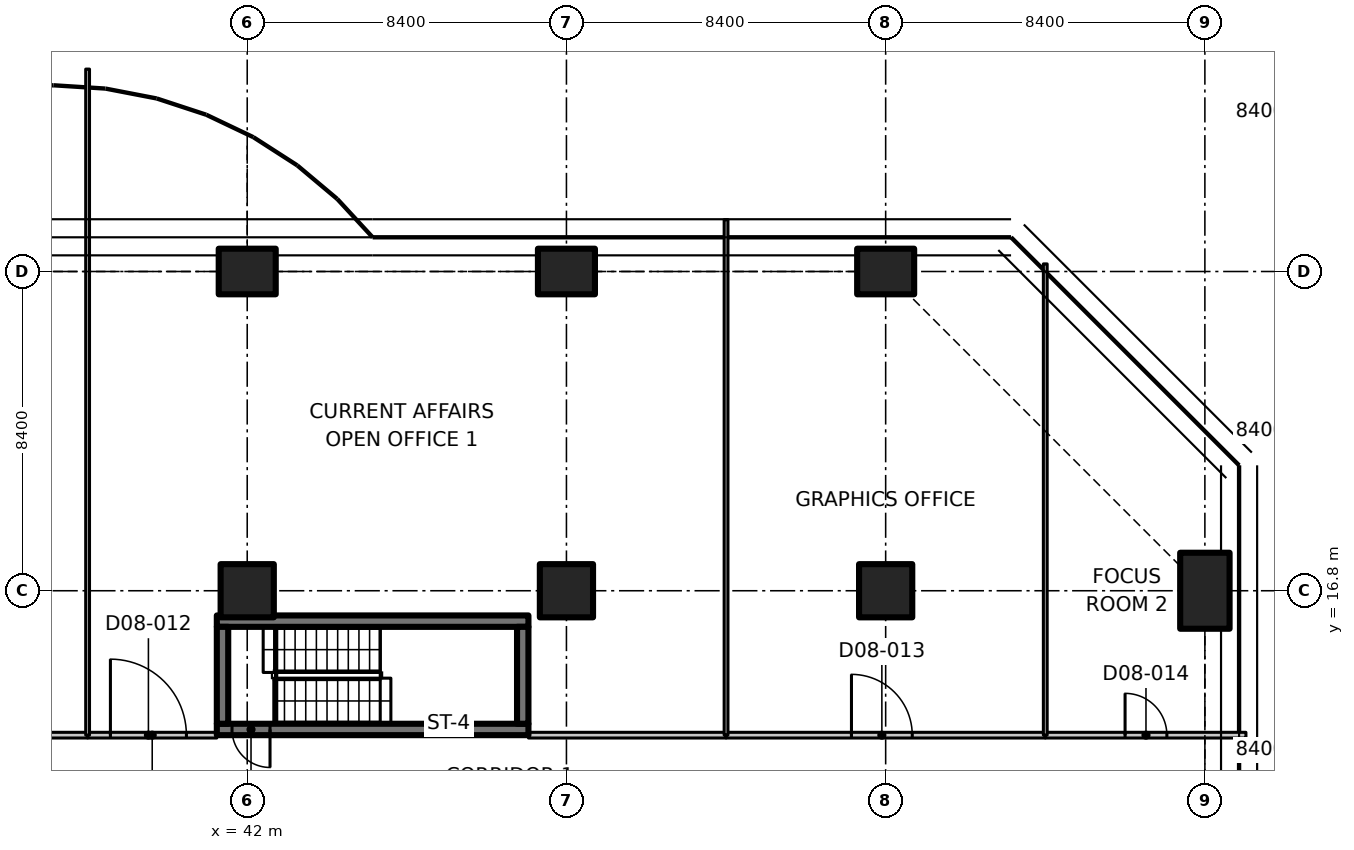
"""IFC4 building model, lengths in metres.
Left out: names, types, materials, properties, quantities, classifications, styles, units other than length and angle.
Written with IfcOpenShell. Run it as: python <this file> out.ifc"""

import sys

from ifc_helpers import new_model, si_unit, direction, frame, frame_2d, origin, origin_2d, place, context, subcontext, project, spatial, polyline, rectangle, outline, extrude, element, fill, save


model = new_model("IFC4")
c1 = context("Model", 3, precision=1e-05, world=origin(), true_north=direction((0.0, 1.0)))
c2 = subcontext(c1, "Body", "Model", "MODEL_VIEW")
j1 = project(units=[si_unit("LENGTHUNIT", "METRE"), si_unit("PLANEANGLEUNIT", "RADIAN")], contexts=[c1])
p1 = place(None, origin())
s1 = spatial("IfcSite", under=j1, at=p1, CompositionType="ELEMENT")
p2 = place(p1, origin())
s2 = spatial("IfcBuilding", under=s1, at=p2, CompositionType="ELEMENT")
p3 = place(p2, frame((0.0, 0.0, 47.3)))
s3 = spatial("IfcBuildingStorey", under=s2, at=p3, CompositionType="ELEMENT", Elevation=47.3)
p4 = place(p3, frame((42.0, 16.8, 0.0), z_axis=(0.0, 0.0, 1.0), x_axis=(1.0, 0.0, 0.0)))
e1 = element("IfcColumn", 1, at=p4, inside=s3, PredefinedType="COLUMN", context=c2, shape_type="SweptSolid", body=[
    extrude(rectangle(XDim=1.4, YDim=1.4, at=origin_2d()), origin(), (0.0, 0.0, 1.0), 3.35),
])
p5 = place(p3, frame((42.0, 25.2, 0.0), z_axis=(0.0, 0.0, 1.0), x_axis=(0.0, 1.0, 0.0)))
e2 = element("IfcColumn", 2, at=p5, inside=s3, PredefinedType="COLUMN", context=c2, shape_type="SweptSolid", body=[
    extrude(rectangle(XDim=1.2, YDim=1.5, at=origin_2d()), origin(), (0.0, 0.0, 1.0), 3.35),
])
p6 = place(p3, frame((50.4, 16.8, 0.0), z_axis=(0.0, 0.0, 1.0), x_axis=(1.0, 0.0, 0.0)))
e3 = element("IfcColumn", 3, at=p6, inside=s3, PredefinedType="COLUMN", context=c2, shape_type="SweptSolid", body=[
    extrude(rectangle(XDim=1.4, YDim=1.4, at=origin_2d()), origin(), (0.0, 0.0, 1.0), 3.35),
])
p7 = place(p3, frame((50.4, 25.2, 0.0), z_axis=(0.0, 0.0, 1.0), x_axis=(0.0, 1.0, 0.0)))
e4 = element("IfcColumn", 4, at=p7, inside=s3, PredefinedType="COLUMN", context=c2, shape_type="SweptSolid", body=[
    extrude(rectangle(XDim=1.2, YDim=1.5, at=origin_2d()), origin(), (0.0, 0.0, 1.0), 3.35),
])
p8 = place(p3, frame((58.8, 16.8, 0.0), z_axis=(0.0, 0.0, 1.0), x_axis=(1.0, 0.0, 0.0)))
e5 = element("IfcColumn", 5, at=p8, inside=s3, PredefinedType="COLUMN", context=c2, shape_type="SweptSolid", body=[
    extrude(rectangle(XDim=1.4, YDim=1.4, at=origin_2d()), origin(), (0.0, 0.0, 1.0), 3.35),
])
p9 = place(p3, frame((58.8, 25.2, 0.0), z_axis=(0.0, 0.0, 1.0), x_axis=(0.0, 1.0, 0.0)))
e6 = element("IfcColumn", 6, at=p9, inside=s3, PredefinedType="COLUMN", context=c2, shape_type="SweptSolid", body=[
    extrude(rectangle(XDim=1.2, YDim=1.5, at=origin_2d()), origin(), (0.0, 0.0, 1.0), 3.35),
])
p10 = place(p3, frame((67.2, 16.8, 0.0), z_axis=(0.0, 0.0, 1.0), x_axis=(1.0, 0.0, 0.0)))
e7 = element("IfcColumn", 7, at=p10, inside=s3, PredefinedType="COLUMN", context=c2, shape_type="SweptSolid", body=[
    extrude(rectangle(XDim=1.3, YDim=2.0, at=origin_2d()), origin(), (0.0, 0.0, 1.0), 3.35),
])
p11 = place(p3, frame((49.4, 13.15, 0.0), z_axis=(0.0, 0.0, 1.0), x_axis=(-1.0, 0.0, 0.0)))
e8 = element("IfcWall", 8, at=p11, inside=s3, PredefinedType="SHEAR", context=c2, shape_type="SweptSolid", body=[
    extrude(rectangle(XDim=8.2, YDim=0.3, at=frame_2d((4.1, 0.0))), origin(), (0.0, 0.0, 1.0), 3.35),
])
p12 = place(p11, frame((6.8, 0.0, 0.0)))
e9 = element("IfcOpeningElement", 9, at=p12, cuts=e8, PredefinedType="OPENING", context=c2, shape_type="SweptSolid", body=[
    extrude(rectangle(XDim=1.0, YDim=2.1, at=frame_2d((0.5, 1.05))), frame((0.0, 0.16, 0.0), z_axis=(0.0, -1.0, 0.0), x_axis=(1.0, 0.0, 0.0)), (0.0, 0.0, 1.0), 0.32),
])
p13 = place(p3, frame((41.2, 16.0, 0.0), z_axis=(0.0, 0.0, 1.0), x_axis=(1.0, 0.0, 0.0)))
e10 = element("IfcWall", 10, at=p13, inside=s3, PredefinedType="SHEAR", context=c2, shape_type="SweptSolid", body=[
    extrude(rectangle(XDim=8.2, YDim=0.3, at=frame_2d((4.1, 0.0))), origin(), (0.0, 0.0, 1.0), 3.35),
])
for number, where, z_axis, x_axis in (
    (11, (41.35, 13.3, 0.0), (0.0, 0.0, 1.0), (0.0, 1.0, 0.0)),
    (12, (49.25, 13.3, 0.0), (0.0, 0.0, 1.0), (0.0, 1.0, 0.0)),
):
    element("IfcWall", number, at=place(p3, frame(where, z_axis=z_axis, x_axis=x_axis)), inside=s3, PredefinedType="SHEAR", context=c2, shape_type="SweptSolid", body=[
        extrude(rectangle(XDim=2.55, YDim=0.3, at=frame_2d((1.275, 0.0))), origin(), (0.0, 0.0, 1.0), 3.35),
    ])
p14 = place(p3, frame((29.4, 13.0, 0.0), z_axis=(0.0, 0.0, 1.0), x_axis=(1.0, 0.0, 0.0)))
e13 = element("IfcWall", 13, at=p14, inside=s3, PredefinedType="PARTITIONING", context=c2, shape_type="SweptSolid", body=[
    extrude(rectangle(XDim=8.4, YDim=0.15, at=frame_2d((4.2, 0.0))), origin(), (0.0, 0.0, 1.0), 3.33),
])
p15 = place(p14, frame((3.3, 0.0, 0.0)))
e14 = element("IfcOpeningElement", 14, at=p15, cuts=e13, PredefinedType="OPENING", context=c2, shape_type="SweptSolid", body=[
    extrude(rectangle(XDim=1.8, YDim=2.1, at=frame_2d((0.9, 1.05))), frame((0.0, 0.085, 0.0), z_axis=(0.0, -1.0, 0.0), x_axis=(1.0, 0.0, 0.0)), (0.0, 0.0, 1.0), 0.17),
])
p16 = place(p3, frame((37.8, 13.0, 0.0), z_axis=(0.0, 0.0, 1.0), x_axis=(1.0, 0.0, 0.0)))
e15 = element("IfcWall", 15, at=p16, inside=s3, PredefinedType="PARTITIONING", context=c2, shape_type="SweptSolid", body=[
    extrude(rectangle(XDim=3.4, YDim=0.15, at=frame_2d((1.7, 0.0))), origin(), (0.0, 0.0, 1.0), 3.33),
])
p17 = place(p16, frame((0.6, 0.0, 0.0)))
e16 = element("IfcOpeningElement", 16, at=p17, cuts=e15, PredefinedType="OPENING", context=c2, shape_type="SweptSolid", body=[
    extrude(rectangle(XDim=2.0, YDim=2.4, at=frame_2d((1.0, 1.2))), frame((0.0, 0.085, 0.0), z_axis=(0.0, -1.0, 0.0), x_axis=(1.0, 0.0, 0.0)), (0.0, 0.0, 1.0), 0.17),
])
p18 = place(p3, frame((49.4, 13.0, 0.0), z_axis=(0.0, 0.0, 1.0), x_axis=(1.0, 0.0, 0.0)))
e17 = element("IfcWall", 17, at=p18, inside=s3, PredefinedType="PARTITIONING", context=c2, shape_type="SweptSolid", body=[
    extrude(rectangle(XDim=5.2, YDim=0.15, at=frame_2d((2.6, 0.0))), origin(), (0.0, 0.0, 1.0), 3.33),
])
p19 = place(p3, frame((54.6, 13.0, 0.0), z_axis=(0.0, 0.0, 1.0), x_axis=(1.0, 0.0, 0.0)))
e18 = element("IfcWall", 18, at=p19, inside=s3, PredefinedType="PARTITIONING", context=c2, shape_type="SweptSolid", body=[
    extrude(rectangle(XDim=8.4, YDim=0.15, at=frame_2d((4.2, 0.0))), origin(), (0.0, 0.0, 1.0), 3.33),
])
p20 = place(p19, frame((3.3, 0.0, 0.0)))
e19 = element("IfcOpeningElement", 19, at=p20, cuts=e18, PredefinedType="OPENING", context=c2, shape_type="SweptSolid", body=[
    extrude(rectangle(XDim=1.6, YDim=2.1, at=frame_2d((0.8, 1.05))), frame((0.0, 0.085, 0.0), z_axis=(0.0, -1.0, 0.0), x_axis=(1.0, 0.0, 0.0)), (0.0, 0.0, 1.0), 0.17),
])
p21 = place(p3, frame((63.0, 13.0, 0.0), z_axis=(0.0, 0.0, 1.0), x_axis=(1.0, 0.0, 0.0)))
e20 = element("IfcWall", 20, at=p21, inside=s3, PredefinedType="PARTITIONING", context=c2, shape_type="SweptSolid", body=[
    extrude(outline(polyline([(0.0, 0.0), (5.28, 0.0), (5.28, 3.33), (4.65, 3.33), (4.648, 2.98), (3.752, 2.98), (3.75, 3.33), (0.0, 3.33), (0.0, 0.0)])), frame((0.0, 0.075, 0.0), z_axis=(0.0, -1.0, 0.0), x_axis=(1.0, 0.0, 0.0)), (0.0, 0.0, 1.0), 0.15),
])
p22 = place(p21, frame((2.1, 0.0, 0.0)))
e21 = element("IfcOpeningElement", 21, at=p22, cuts=e20, PredefinedType="OPENING", context=c2, shape_type="SweptSolid", body=[
    extrude(rectangle(XDim=1.1, YDim=2.1, at=frame_2d((0.55, 1.05))), frame((0.0, 0.085, 0.0), z_axis=(0.0, -1.0, 0.0), x_axis=(1.0, 0.0, 0.0)), (0.0, 0.0, 1.0), 0.17),
])
p23 = place(p3, frame((37.8, 30.526, 0.0), z_axis=(0.0, 0.0, 1.0), x_axis=(0.0, -1.0, 0.0)))
e22 = element("IfcWall", 22, at=p23, inside=s3, PredefinedType="PARTITIONING", context=c2, shape_type="SweptSolid", body=[
    extrude(outline(polyline([(0.0, 0.0), (17.526, 0.0), (17.526, 3.33), (5.776, 3.33), (5.774, 2.98), (4.878, 2.98), (4.876, 3.33), (0.283, 3.33), (0.0, 3.33), (0.0, 0.0)])), frame((0.0, 0.05, 0.0), z_axis=(0.0, -1.0, 0.0), x_axis=(1.0, 0.0, 0.0)), (0.0, 0.0, 1.0), 0.1),
])
p24 = place(p3, frame((54.6, 26.565, 0.0), z_axis=(0.0, 0.0, 1.0), x_axis=(0.0, -1.0, 0.0)))
e23 = element("IfcWall", 23, at=p24, inside=s3, PredefinedType="PARTITIONING", context=c2, shape_type="SweptSolid", body=[
    extrude(outline(polyline([(0.0, 0.0), (13.565, 0.0), (13.565, 3.33), (1.815, 3.33), (1.813, 2.98), (0.917, 2.98), (0.915, 3.33), (0.265, 3.33), (0.0, 3.33), (0.0, 0.0)])), frame((0.0, 0.05, 0.0), z_axis=(0.0, -1.0, 0.0), x_axis=(1.0, 0.0, 0.0)), (0.0, 0.0, 1.0), 0.1),
])
p25 = place(p3, frame((63.0, 25.4, 0.0), z_axis=(0.0, 0.0, 1.0), x_axis=(0.0, -1.0, 0.0)))
e24 = element("IfcWall", 24, at=p25, inside=s3, PredefinedType="PARTITIONING", context=c2, shape_type="SweptSolid", body=[
    extrude(outline(polyline([(0.0, 0.0), (12.4, 0.0), (12.4, 3.33), (5.066, 3.33), (5.064, 2.98), (3.736, 2.98), (3.734, 3.33), (0.0, 3.33), (0.0, 0.0)])), frame((0.0, 0.05, 0.0), z_axis=(0.0, -1.0, 0.0), x_axis=(1.0, 0.0, 0.0)), (0.0, 0.0, 1.0), 0.1),
])
p26 = place(p12, origin())
e25 = element("IfcDoor", 25, at=p26, inside=s3, OperationType="SINGLE_SWING_RIGHT", PredefinedType="DOOR", context=c2, shape_type="SweptSolid", body=[
    extrude(rectangle(XDim=1.0, YDim=2.1, at=frame_2d((0.5, 1.05))), frame((0.0, 0.025, 0.0), z_axis=(0.0, -1.0, 0.0), x_axis=(1.0, 0.0, 0.0)), (0.0, 0.0, 1.0), 0.05),
])
fill(e9, e25)
p27 = place(p17, origin())
e26 = element("IfcDoor", 26, at=p27, inside=s3, OperationType="DOUBLE_DOOR_SINGLE_SWING", PredefinedType="DOOR", context=c2, shape_type="SweptSolid", body=[
    extrude(rectangle(XDim=2.0, YDim=2.4, at=frame_2d((1.0, 1.2))), frame((0.0, 0.025, 0.0), z_axis=(0.0, -1.0, 0.0), x_axis=(1.0, 0.0, 0.0)), (0.0, 0.0, 1.0), 0.05),
])
fill(e16, e26)
p28 = place(p20, origin())
e27 = element("IfcDoor", 27, at=p28, inside=s3, OperationType="DOUBLE_DOOR_SINGLE_SWING", PredefinedType="DOOR", context=c2, shape_type="SweptSolid", body=[
    extrude(rectangle(XDim=1.6, YDim=2.1, at=frame_2d((0.8, 1.05))), frame((0.0, 0.025, 0.0), z_axis=(0.0, -1.0, 0.0), x_axis=(1.0, 0.0, 0.0)), (0.0, 0.0, 1.0), 0.05),
])
fill(e19, e27)
p29 = place(p22, origin())
e28 = element("IfcDoor", 28, at=p29, inside=s3, OperationType="SINGLE_SWING_LEFT", PredefinedType="DOOR", context=c2, shape_type="SweptSolid", body=[
    extrude(rectangle(XDim=1.1, YDim=2.1, at=frame_2d((0.55, 1.05))), frame((0.0, 0.025, 0.0), z_axis=(0.0, -1.0, 0.0), x_axis=(1.0, 0.0, 0.0)), (0.0, 0.0, 1.0), 0.05),
])
fill(e21, e28)
save(model, sys.argv[1])
